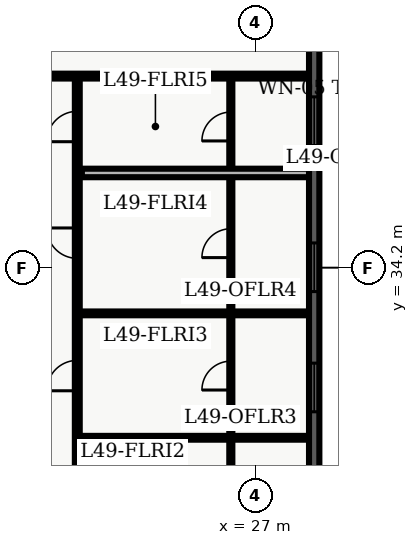
"""IFC4 building model, lengths in metres.
Left out: names, types, materials, properties, quantities, classifications, styles, units other than length and angle.
Written with IfcOpenShell. Run it as: python <this file> out.ifc"""

import sys

from ifc_helpers import new_model, entity, si_unit, converted_unit, direction, frame, origin_with_axes, origin_2d_with_axis, place, context, subcontext, project, spatial, polyline, rectangle, outline, extrude, element, fill, save


model = new_model("IFC4")
c1 = context("Model", 3, precision=1e-05, world=origin_with_axes(), true_north=direction((0.0, 1.0)))
c2 = subcontext(c1, "Body", "Model", "MODEL_VIEW")
j1 = project(units=[si_unit("LENGTHUNIT", "METRE"), converted_unit("PLANEANGLEUNIT", "DEGREE", entity("IfcPlaneAngleMeasure", 0.017), si_unit("PLANEANGLEUNIT", "RADIAN"), dimensions=[0, 0, 0, 0, 0, 0, 0])], contexts=[c1])
p1 = place(None, origin_with_axes())
s1 = spatial("IfcSite", under=j1, at=p1, CompositionType="ELEMENT")
p2 = place(p1, origin_with_axes())
s2 = spatial("IfcBuilding", under=s1, at=p2, CompositionType="ELEMENT")
p3 = place(p2, frame((0.0, 0.0, 200.4), z_axis=(0.0, 0.0, 1.0), x_axis=(1.0, 0.0, 0.0)))
s3 = spatial("IfcBuildingStorey", under=s2, at=p3, CompositionType="ELEMENT", Elevation=200.4)
p4 = place(p3, frame((2.6, 40.5, 0.0), z_axis=(0.0, 0.0, 1.0), x_axis=(1.0, 0.0, 0.0)))
e1 = element("IfcWall", 1, at=p4, inside=s3, PredefinedType="PARTITIONING", context=c2, shape_type="SweptSolid", body=[
    extrude(outline(polyline([(0.0, -0.08), (26.177, -0.08), (26.177, 0.08), (0.0, 0.08), (0.0, -0.08)])), origin_with_axes(), (0.0, 0.0, 1.0), 2.7),
])
p5 = place(p4, frame((1.554, 0.0, 0.0), z_axis=(0.0, 0.0, 1.0), x_axis=(1.0, 0.0, 0.0)))
e2 = element("IfcOpeningElement", 2, at=p5, cuts=e1, PredefinedType="OPENING", context=c2, shape_type="SweptSolid", body=[
    extrude(rectangle(XDim=1.0, YDim=0.18, at=origin_2d_with_axis()), origin_with_axes(), (0.0, 0.0, 1.0), 2.15),
])
p6 = place(p4, frame((6.84, 0.0, 0.0), z_axis=(0.0, 0.0, 1.0), x_axis=(1.0, 0.0, 0.0)))
e3 = element("IfcOpeningElement", 3, at=p6, cuts=e1, PredefinedType="OPENING", context=c2, shape_type="SweptSolid", body=[
    extrude(rectangle(XDim=1.0, YDim=0.18, at=origin_2d_with_axis()), origin_with_axes(), (0.0, 0.0, 1.0), 2.15),
])
p7 = place(p4, frame((10.996, 0.0, 0.0), z_axis=(0.0, 0.0, 1.0), x_axis=(1.0, 0.0, 0.0)))
e4 = element("IfcOpeningElement", 4, at=p7, cuts=e1, PredefinedType="OPENING", context=c2, shape_type="SweptSolid", body=[
    extrude(rectangle(XDim=1.0, YDim=0.18, at=origin_2d_with_axis()), origin_with_axes(), (0.0, 0.0, 1.0), 2.15),
])
p8 = place(p4, frame((15.636, 0.0, 0.0), z_axis=(0.0, 0.0, 1.0), x_axis=(1.0, 0.0, 0.0)))
e5 = element("IfcOpeningElement", 5, at=p8, cuts=e1, PredefinedType="OPENING", context=c2, shape_type="SweptSolid", body=[
    extrude(rectangle(XDim=1.0, YDim=0.18, at=origin_2d_with_axis()), origin_with_axes(), (0.0, 0.0, 1.0), 2.15),
])
p9 = place(p3, frame((21.15, 7.8, 0.0), z_axis=(0.0, 0.0, 1.0), x_axis=(0.0, 1.0, 0.0)))
e6 = element("IfcWall", 6, at=p9, inside=s3, PredefinedType="PARTITIONING", context=c2, shape_type="SweptSolid", body=[
    extrude(outline(polyline([(0.0, -0.08), (32.7, -0.08), (32.7, 0.08), (0.0, 0.08), (0.0, -0.08)])), origin_with_axes(), (0.0, 0.0, 1.0), 2.7),
])
p10 = place(p9, frame((15.589, 0.0, 0.0), z_axis=(0.0, 0.0, 1.0), x_axis=(1.0, 0.0, 0.0)))
e7 = element("IfcOpeningElement", 7, at=p10, cuts=e6, PredefinedType="OPENING", context=c2, shape_type="SweptSolid", body=[
    extrude(rectangle(XDim=1.0, YDim=0.18, at=origin_2d_with_axis()), origin_with_axes(), (0.0, 0.0, 1.0), 2.15),
])
p11 = place(p9, frame((19.026, 0.0, 0.0), z_axis=(0.0, 0.0, 1.0), x_axis=(1.0, 0.0, 0.0)))
e8 = element("IfcOpeningElement", 8, at=p11, cuts=e6, PredefinedType="OPENING", context=c2, shape_type="SweptSolid", body=[
    extrude(rectangle(XDim=1.0, YDim=0.18, at=origin_2d_with_axis()), origin_with_axes(), (0.0, 0.0, 1.0), 2.15),
])
p12 = place(p9, frame((22.849, 0.0, 0.0), z_axis=(0.0, 0.0, 1.0), x_axis=(1.0, 0.0, 0.0)))
e9 = element("IfcOpeningElement", 9, at=p12, cuts=e6, PredefinedType="OPENING", context=c2, shape_type="SweptSolid", body=[
    extrude(rectangle(XDim=1.0, YDim=0.18, at=origin_2d_with_axis()), origin_with_axes(), (0.0, 0.0, 1.0), 2.15),
])
p13 = place(p9, frame((27.204, 0.0, 0.0), z_axis=(0.0, 0.0, 1.0), x_axis=(1.0, 0.0, 0.0)))
e10 = element("IfcOpeningElement", 10, at=p13, cuts=e6, PredefinedType="OPENING", context=c2, shape_type="SweptSolid", body=[
    extrude(rectangle(XDim=1.0, YDim=0.18, at=origin_2d_with_axis()), origin_with_axes(), (0.0, 0.0, 1.0), 2.15),
])
p14 = place(p9, frame((31.042, 0.0, 0.0), z_axis=(0.0, 0.0, 1.0), x_axis=(1.0, 0.0, 0.0)))
e11 = element("IfcOpeningElement", 11, at=p14, cuts=e6, PredefinedType="OPENING", context=c2, shape_type="SweptSolid", body=[
    extrude(rectangle(XDim=1.0, YDim=0.18, at=origin_2d_with_axis()), origin_with_axes(), (0.0, 0.0, 1.0), 2.15),
])
p15 = place(p9, frame((5.775, 0.0, 0.0), z_axis=(0.0, 0.0, 1.0), x_axis=(1.0, 0.0, 0.0)))
e12 = element("IfcOpeningElement", 12, at=p15, cuts=e6, PredefinedType="OPENING", context=c2, shape_type="SweptSolid", body=[
    extrude(rectangle(XDim=1.05, YDim=0.18, at=origin_2d_with_axis()), origin_with_axes(), (0.0, 0.0, 1.0), 2.15),
])
p16 = place(p3, frame((26.2, 21.8, 0.0), z_axis=(0.0, 0.0, 1.0), x_axis=(0.0, 1.0, 0.0)))
e13 = element("IfcWall", 13, at=p16, inside=s3, PredefinedType="PARTITIONING", context=c2, shape_type="SweptSolid", body=[
    extrude(outline(polyline([(0.0, -0.05), (18.5, -0.05), (18.5, 0.05), (0.0, 0.05), (0.0, -0.05)])), origin_with_axes(), (0.0, 0.0, 1.0), 2.7),
])
p17 = place(p16, frame((1.589, 0.0, 0.0), z_axis=(0.0, 0.0, 1.0), x_axis=(1.0, 0.0, 0.0)))
e14 = element("IfcOpeningElement", 14, at=p17, cuts=e13, PredefinedType="OPENING", context=c2, shape_type="SweptSolid", body=[
    extrude(rectangle(XDim=0.95, YDim=0.12, at=origin_2d_with_axis()), origin_with_axes(), (0.0, 0.0, 1.0), 2.15),
])
p18 = place(p16, frame((5.026, 0.0, 0.0), z_axis=(0.0, 0.0, 1.0), x_axis=(1.0, 0.0, 0.0)))
e15 = element("IfcOpeningElement", 15, at=p18, cuts=e13, PredefinedType="OPENING", context=c2, shape_type="SweptSolid", body=[
    extrude(rectangle(XDim=0.95, YDim=0.12, at=origin_2d_with_axis()), origin_with_axes(), (0.0, 0.0, 1.0), 2.15),
])
p19 = place(p16, frame((8.849, 0.0, 0.0), z_axis=(0.0, 0.0, 1.0), x_axis=(1.0, 0.0, 0.0)))
e16 = element("IfcOpeningElement", 16, at=p19, cuts=e13, PredefinedType="OPENING", context=c2, shape_type="SweptSolid", body=[
    extrude(rectangle(XDim=0.95, YDim=0.12, at=origin_2d_with_axis()), origin_with_axes(), (0.0, 0.0, 1.0), 2.15),
])
p20 = place(p16, frame((13.204, 0.0, 0.0), z_axis=(0.0, 0.0, 1.0), x_axis=(1.0, 0.0, 0.0)))
e17 = element("IfcOpeningElement", 17, at=p20, cuts=e13, PredefinedType="OPENING", context=c2, shape_type="SweptSolid", body=[
    extrude(rectangle(XDim=0.95, YDim=0.12, at=origin_2d_with_axis()), origin_with_axes(), (0.0, 0.0, 1.0), 2.15),
])
p21 = place(p16, frame((17.042, 0.0, 0.0), z_axis=(0.0, 0.0, 1.0), x_axis=(1.0, 0.0, 0.0)))
e18 = element("IfcOpeningElement", 18, at=p21, cuts=e13, PredefinedType="OPENING", context=c2, shape_type="SweptSolid", body=[
    extrude(rectangle(XDim=0.95, YDim=0.12, at=origin_2d_with_axis()), origin_with_axes(), (0.0, 0.0, 1.0), 2.15),
])
for number, where, z_axis, x_axis in (
    (19, (21.3, 28.603, 0.0), (0.0, 0.0, 1.0), (1.0, 0.0, 0.0)),
    (20, (21.3, 32.695, 0.0), (0.0, 0.0, 1.0), (1.0, 0.0, 0.0)),
):
    element("IfcWall", number, at=place(p3, frame(where, z_axis=z_axis, x_axis=x_axis)), inside=s3, PredefinedType="PARTITIONING", context=c2, shape_type="SweptSolid", body=[
        extrude(outline(polyline([(0.0, -0.062), (7.477, -0.062), (7.477, 0.062), (0.0, 0.062), (0.0, -0.062)])), origin_with_axes(), (0.0, 0.0, 1.0), 2.7),
    ])
p22 = place(p3, frame((21.3, 37.314, 0.0), z_axis=(0.0, 0.0, 1.0), x_axis=(1.0, 0.0, 0.0)))
e21 = element("IfcWall", 21, at=p22, inside=s3, PredefinedType="PARTITIONING", context=c2, shape_type="SweptSolid", body=[
    extrude(outline(polyline([(0.0, -0.14), (7.477, -0.14), (7.477, 0.14), (0.0, 0.14), (0.0, -0.14)])), origin_with_axes(), (0.0, 0.0, 1.0), 2.7),
])
p23 = place(p3, frame((28.942, 42.02, 0.0), z_axis=(0.0, 0.0, 1.0), x_axis=(0.0, -1.0, 0.0)))
e22 = element("IfcWall", 22, at=p23, inside=s3, PredefinedType="SOLIDWALL", context=c2, shape_type="SweptSolid", body=[
    extrude(outline(polyline([(0.0, -0.17), (20.42, -0.17), (20.42, 0.17), (0.0, 0.17), (0.0, -0.17)])), origin_with_axes(), (0.0, 0.0, 1.0), 3.66),
])
p24 = place(p23, frame((3.003, 0.0, 0.45), z_axis=(0.0, 0.0, 1.0), x_axis=(1.0, 0.0, 0.0)))
e23 = element("IfcOpeningElement", 23, at=p24, cuts=e22, PredefinedType="OPENING", context=c2, shape_type="SweptSolid", body=[
    extrude(rectangle(XDim=1.6, YDim=0.36, at=origin_2d_with_axis()), origin_with_axes(), (0.0, 0.0, 1.0), 2.2),
])
p25 = place(p23, frame((7.808, 0.0, 0.45), z_axis=(0.0, 0.0, 1.0), x_axis=(1.0, 0.0, 0.0)))
e24 = element("IfcOpeningElement", 24, at=p25, cuts=e22, PredefinedType="OPENING", context=c2, shape_type="SweptSolid", body=[
    extrude(rectangle(XDim=1.6, YDim=0.36, at=origin_2d_with_axis()), origin_with_axes(), (0.0, 0.0, 1.0), 2.2),
])
p26 = place(p23, frame((11.762, 0.0, 0.45), z_axis=(0.0, 0.0, 1.0), x_axis=(1.0, 0.0, 0.0)))
e25 = element("IfcOpeningElement", 25, at=p26, cuts=e22, PredefinedType="OPENING", context=c2, shape_type="SweptSolid", body=[
    extrude(rectangle(XDim=1.6, YDim=0.36, at=origin_2d_with_axis()), origin_with_axes(), (0.0, 0.0, 1.0), 2.2),
])
p27 = place(p16, frame((8.849, 0.0, 0.0), z_axis=(0.0, 0.0, 1.0), x_axis=(1.0, 0.0, 0.0)))
e26 = element("IfcDoor", 26, at=p27, inside=s3, OperationType="SINGLE_SWING_LEFT", PredefinedType="DOOR", context=c2, shape_type="SweptSolid", body=[
    extrude(rectangle(XDim=0.95, YDim=0.06, at=origin_2d_with_axis()), origin_with_axes(), (0.0, 0.0, 1.0), 2.15),
])
fill(e16, e26)
p28 = place(p9, frame((22.849, 0.0, 0.0), z_axis=(0.0, 0.0, 1.0), x_axis=(1.0, 0.0, 0.0)))
e27 = element("IfcDoor", 27, at=p28, inside=s3, OperationType="SINGLE_SWING_LEFT", PredefinedType="DOOR", context=c2, shape_type="SweptSolid", body=[
    extrude(rectangle(XDim=1.0, YDim=0.09, at=origin_2d_with_axis()), origin_with_axes(), (0.0, 0.0, 1.0), 2.15),
])
fill(e9, e27)
p29 = place(p16, frame((13.204, 0.0, 0.0), z_axis=(0.0, 0.0, 1.0), x_axis=(1.0, 0.0, 0.0)))
e28 = element("IfcDoor", 28, at=p29, inside=s3, OperationType="SINGLE_SWING_LEFT", PredefinedType="DOOR", context=c2, shape_type="SweptSolid", body=[
    extrude(rectangle(XDim=0.95, YDim=0.06, at=origin_2d_with_axis()), origin_with_axes(), (0.0, 0.0, 1.0), 2.15),
])
fill(e17, e28)
p30 = place(p9, frame((27.204, 0.0, 0.0), z_axis=(0.0, 0.0, 1.0), x_axis=(1.0, 0.0, 0.0)))
e29 = element("IfcDoor", 29, at=p30, inside=s3, OperationType="SINGLE_SWING_RIGHT", PredefinedType="DOOR", context=c2, shape_type="SweptSolid", body=[
    extrude(rectangle(XDim=1.0, YDim=0.09, at=origin_2d_with_axis()), origin_with_axes(), (0.0, 0.0, 1.0), 2.15),
])
fill(e10, e29)
p31 = place(p16, frame((17.042, 0.0, 0.0), z_axis=(0.0, 0.0, 1.0), x_axis=(1.0, 0.0, 0.0)))
e30 = element("IfcDoor", 30, at=p31, inside=s3, OperationType="SINGLE_SWING_LEFT", PredefinedType="DOOR", context=c2, shape_type="SweptSolid", body=[
    extrude(rectangle(XDim=0.95, YDim=0.06, at=origin_2d_with_axis()), origin_with_axes(), (0.0, 0.0, 1.0), 2.15),
])
fill(e18, e30)
p32 = place(p9, frame((31.042, 0.0, 0.0), z_axis=(0.0, 0.0, 1.0), x_axis=(1.0, 0.0, 0.0)))
e31 = element("IfcDoor", 31, at=p32, inside=s3, OperationType="SINGLE_SWING_LEFT", PredefinedType="DOOR", context=c2, shape_type="SweptSolid", body=[
    extrude(rectangle(XDim=1.0, YDim=0.09, at=origin_2d_with_axis()), origin_with_axes(), (0.0, 0.0, 1.0), 2.15),
])
fill(e11, e31)
p33 = place(p23, frame((3.003, 0.0, 0.45), z_axis=(0.0, 0.0, 1.0), x_axis=(1.0, 0.0, 0.0)))
e32 = element("IfcWindow", 32, at=p33, inside=s3, PredefinedType="WINDOW", context=c2, shape_type="SweptSolid", body=[
    extrude(rectangle(XDim=1.6, YDim=0.09, at=origin_2d_with_axis()), origin_with_axes(), (0.0, 0.0, 1.0), 2.2),
])
fill(e23, e32)
p34 = place(p23, frame((7.808, 0.0, 0.45), z_axis=(0.0, 0.0, 1.0), x_axis=(1.0, 0.0, 0.0)))
e33 = element("IfcWindow", 33, at=p34, inside=s3, PredefinedType="WINDOW", context=c2, shape_type="SweptSolid", body=[
    extrude(rectangle(XDim=1.6, YDim=0.09, at=origin_2d_with_axis()), origin_with_axes(), (0.0, 0.0, 1.0), 2.2),
])
fill(e24, e33)
p35 = place(p23, frame((11.762, 0.0, 0.45), z_axis=(0.0, 0.0, 1.0), x_axis=(1.0, 0.0, 0.0)))
e34 = element("IfcWindow", 34, at=p35, inside=s3, PredefinedType="WINDOW", context=c2, shape_type="SweptSolid", body=[
    extrude(rectangle(XDim=1.6, YDim=0.09, at=origin_2d_with_axis()), origin_with_axes(), (0.0, 0.0, 1.0), 2.2),
])
fill(e25, e34)
save(model, sys.argv[1])
